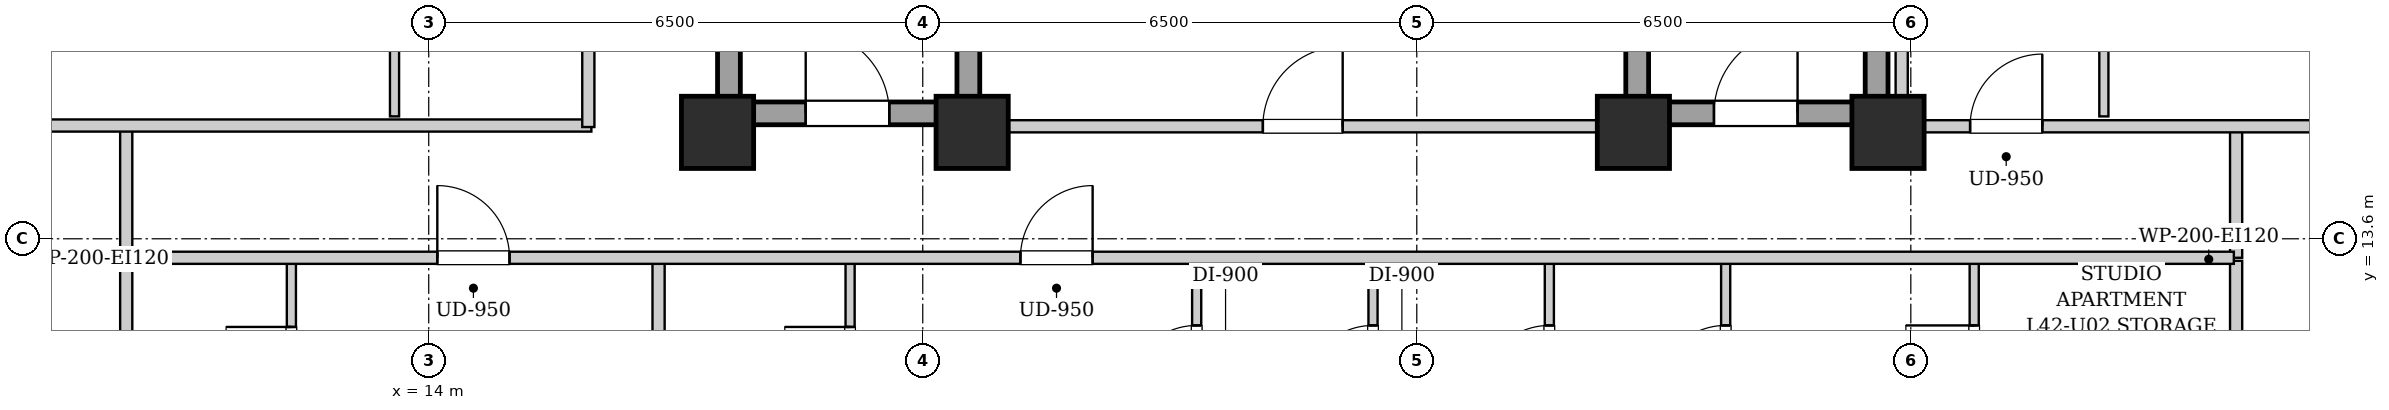
"""IFC4 building model, lengths in metres.
Left out: names, types, materials, properties, quantities, classifications, styles, units other than length and angle.
Written with IfcOpenShell. Run it as: python <this file> out.ifc"""

import sys

from ifc_helpers import new_model, si_unit, direction, frame, frame_2d, origin, origin_2d, place, context, subcontext, project, spatial, rectangle, extrude, element, fill, save


model = new_model("IFC4")
c1 = context("Model", 3, precision=1e-05, world=origin(), true_north=direction((0.0, 1.0)))
c2 = subcontext(c1, "Body", "Model", "MODEL_VIEW")
j1 = project(units=[si_unit("LENGTHUNIT", "METRE"), si_unit("PLANEANGLEUNIT", "RADIAN")], contexts=[c1])
p1 = place(None, origin())
s1 = spatial("IfcSite", under=j1, at=p1, CompositionType="ELEMENT")
p2 = place(p1, origin())
s2 = spatial("IfcBuilding", under=s1, at=p2, CompositionType="ELEMENT")
p3 = place(p2, frame((0.0, 0.0, 147.15)))
s3 = spatial("IfcBuildingStorey", under=s2, at=p3, CompositionType="ELEMENT", Elevation=147.15)
for number, where, z_axis, x_axis in (
    (1, (17.8, 15.0, 0.0), (0.0, 0.0, 1.0), (1.0, 0.0, 0.0)),
    (2, (21.15, 15.0, 0.0), (0.0, 0.0, 1.0), (1.0, 0.0, 0.0)),
    (3, (29.85, 15.0, 0.0), (0.0, 0.0, 1.0), (1.0, 0.0, 0.0)),
    (4, (33.2, 15.0, 0.0), (0.0, 0.0, 1.0), (1.0, 0.0, 0.0)),
):
    element("IfcColumn", number, at=place(p3, frame(where, z_axis=z_axis, x_axis=x_axis)), inside=s3, PredefinedType="COLUMN", context=c2, shape_type="SweptSolid", body=[
        extrude(rectangle(XDim=0.95, YDim=0.95, at=origin_2d()), origin(), (0.0, 0.0, 1.0), 3.25),
    ])
for number, where, z_axis, x_axis in (
    (5, (17.95, 15.1, 0.0), (0.0, 0.0, 1.0), (0.0, 1.0, 0.0)),
    (6, (21.1, 15.1, 0.0), (0.0, 0.0, 1.0), (0.0, 1.0, 0.0)),
):
    element("IfcWall", number, at=place(p3, frame(where, z_axis=z_axis, x_axis=x_axis)), inside=s3, PredefinedType="SHEAR", context=c2, shape_type="SweptSolid", body=[
        extrude(rectangle(XDim=9.0, YDim=0.3, at=frame_2d((4.5, 0.0))), origin(), (0.0, 0.0, 1.0), 2.99),
    ])
p4 = place(p3, frame((18.1, 15.25, 0.0), z_axis=(0.0, 0.0, 1.0), x_axis=(1.0, 0.0, 0.0)))
e7 = element("IfcWall", 7, at=p4, inside=s3, PredefinedType="SHEAR", context=c2, shape_type="SweptSolid", body=[
    extrude(rectangle(XDim=2.85, YDim=0.3, at=frame_2d((1.425, 0.0))), origin(), (0.0, 0.0, 1.0), 2.99),
])
p5 = place(p4, frame((0.86, 0.0, 0.0)))
e8 = element("IfcOpeningElement", 8, at=p5, cuts=e7, PredefinedType="OPENING", context=c2, shape_type="SweptSolid", body=[
    extrude(rectangle(XDim=1.1, YDim=2.05, at=frame_2d((0.55, 1.025))), frame((0.0, 0.16, 0.0), z_axis=(0.0, -1.0, 0.0), x_axis=(1.0, 0.0, 0.0)), (0.0, 0.0, 1.0), 0.32),
])
for number, where, z_axis, x_axis in (
    (9, (29.9, 15.1, 0.0), (0.0, 0.0, 1.0), (0.0, 1.0, 0.0)),
    (10, (33.05, 15.1, 0.0), (0.0, 0.0, 1.0), (0.0, 1.0, 0.0)),
):
    element("IfcWall", number, at=place(p3, frame(where, z_axis=z_axis, x_axis=x_axis)), inside=s3, PredefinedType="SHEAR", context=c2, shape_type="SweptSolid", body=[
        extrude(rectangle(XDim=9.0, YDim=0.3, at=frame_2d((4.5, 0.0))), origin(), (0.0, 0.0, 1.0), 2.99),
    ])
p6 = place(p3, frame((30.05, 15.25, 0.0), z_axis=(0.0, 0.0, 1.0), x_axis=(1.0, 0.0, 0.0)))
e11 = element("IfcWall", 11, at=p6, inside=s3, PredefinedType="SHEAR", context=c2, shape_type="SweptSolid", body=[
    extrude(rectangle(XDim=2.85, YDim=0.3, at=frame_2d((1.425, 0.0))), origin(), (0.0, 0.0, 1.0), 2.99),
])
p7 = place(p6, frame((0.86, 0.0, 0.0)))
e12 = element("IfcOpeningElement", 12, at=p7, cuts=e11, PredefinedType="OPENING", context=c2, shape_type="SweptSolid", body=[
    extrude(rectangle(XDim=1.1, YDim=2.05, at=frame_2d((0.55, 1.025))), frame((0.0, 0.16, 0.0), z_axis=(0.0, -1.0, 0.0), x_axis=(1.0, 0.0, 0.0)), (0.0, 0.0, 1.0), 0.32),
])
p8 = place(p3, frame((21.25, 15.08, 0.0), z_axis=(0.0, 0.0, 1.0), x_axis=(1.0, 0.0, 0.0)))
e13 = element("IfcWall", 13, at=p8, inside=s3, PredefinedType="PARTITIONING", context=c2, shape_type="SweptSolid", body=[
    extrude(rectangle(XDim=8.5, YDim=0.16, at=frame_2d((4.25, 0.0))), origin(), (0.0, 0.0, 1.0), 2.442),
])
p9 = place(p8, frame((3.725, 0.0, 0.0)))
e14 = element("IfcOpeningElement", 14, at=p9, cuts=e13, PredefinedType="OPENING", context=c2, shape_type="SweptSolid", body=[
    extrude(rectangle(XDim=1.05, YDim=2.05, at=frame_2d((0.525, 1.025))), frame((0.0, 0.09, 0.0), z_axis=(0.0, -1.0, 0.0), x_axis=(1.0, 0.0, 0.0)), (0.0, 0.0, 1.0), 0.18),
])
for number, where, z_axis, x_axis in (
    (15, (10.02, 13.35, 0.0), (0.0, 0.0, 1.0), (0.0, 1.0, 0.0)),
    (16, (37.78, 13.35, 0.0), (0.0, 0.0, 1.0), (0.0, 1.0, 0.0)),
):
    element("IfcWall", number, at=place(p3, frame(where, z_axis=z_axis, x_axis=x_axis)), inside=s3, PredefinedType="PARTITIONING", context=c2, shape_type="SweptSolid", body=[
        extrude(rectangle(XDim=1.74, YDim=0.16, at=frame_2d((0.87, 0.0))), origin(), (0.0, 0.0, 1.0), 2.99),
    ])
p10 = place(p3, frame((7.78, 15.09, 0.0), z_axis=(0.0, 0.0, 1.0), x_axis=(1.0, 0.0, 0.0)))
e17 = element("IfcWall", 17, at=p10, inside=s3, PredefinedType="PARTITIONING", context=c2, shape_type="SweptSolid", body=[
    extrude(rectangle(XDim=8.36, YDim=0.16, at=frame_2d((4.18, 0.0))), origin(), (0.0, 0.0, 1.0), 2.442),
])
p11 = place(p3, frame((10.02, 10.65, 0.0), z_axis=(0.0, 0.0, 1.0), x_axis=(0.0, 1.0, 0.0)))
e18 = element("IfcWall", 18, at=p11, inside=s3, PredefinedType="PARTITIONING", context=c2, shape_type="SweptSolid", body=[
    extrude(rectangle(XDim=2.66, YDim=0.16, at=frame_2d((1.33, 0.0))), origin(), (0.0, 0.0, 1.0), 2.99),
])
p12 = place(p3, frame((12.193, 10.71, 0.0), z_axis=(0.0, 0.0, 1.0), x_axis=(0.0, 1.0, 0.0)))
e19 = element("IfcWall", 19, at=p12, inside=s3, PredefinedType="PARTITIONING", context=c2, shape_type="SweptSolid", body=[
    extrude(rectangle(XDim=2.6, YDim=0.12, at=frame_2d((1.3, 0.0))), origin(), (0.0, 0.0, 1.0), 2.99),
])
p13 = place(p12, frame((0.87, 0.0, 0.0)))
e20 = element("IfcOpeningElement", 20, at=p13, cuts=e19, PredefinedType="OPENING", context=c2, shape_type="SweptSolid", body=[
    extrude(rectangle(XDim=0.86, YDim=2.05, at=frame_2d((0.43, 1.025))), frame((0.0, 0.07, 0.0), z_axis=(0.0, -1.0, 0.0), x_axis=(1.0, 0.0, 0.0)), (0.0, 0.0, 1.0), 0.14),
])
p14 = place(p3, frame((37.78, 10.65, 0.0), z_axis=(0.0, 0.0, 1.0), x_axis=(0.0, 1.0, 0.0)))
e21 = element("IfcWall", 21, at=p14, inside=s3, PredefinedType="PARTITIONING", context=c2, shape_type="SweptSolid", body=[
    extrude(rectangle(XDim=2.66, YDim=0.16, at=frame_2d((1.33, 0.0))), origin(), (0.0, 0.0, 1.0), 2.99),
])
p15 = place(p3, frame((17.024, 6.06, 0.0), z_axis=(0.0, 0.0, 1.0), x_axis=(0.0, 1.0, 0.0)))
e22 = element("IfcWall", 22, at=p15, inside=s3, PredefinedType="PARTITIONING", context=c2, shape_type="SweptSolid", body=[
    extrude(rectangle(XDim=7.25, YDim=0.16, at=frame_2d((3.625, 0.0))), origin(), (0.0, 0.0, 1.0), 2.99),
])
p16 = place(p3, frame((19.544, 10.71, 0.0), z_axis=(0.0, 0.0, 1.0), x_axis=(0.0, 1.0, 0.0)))
e23 = element("IfcWall", 23, at=p16, inside=s3, PredefinedType="PARTITIONING", context=c2, shape_type="SweptSolid", body=[
    extrude(rectangle(XDim=2.6, YDim=0.12, at=frame_2d((1.3, 0.0))), origin(), (0.0, 0.0, 1.0), 2.99),
])
p17 = place(p16, frame((0.87, 0.0, 0.0)))
e24 = element("IfcOpeningElement", 24, at=p17, cuts=e23, PredefinedType="OPENING", context=c2, shape_type="SweptSolid", body=[
    extrude(rectangle(XDim=0.86, YDim=2.05, at=frame_2d((0.43, 1.025))), frame((0.0, 0.07, 0.0), z_axis=(0.0, -1.0, 0.0), x_axis=(1.0, 0.0, 0.0)), (0.0, 0.0, 1.0), 0.14),
])
p18 = place(p3, frame((24.104, 10.71, 0.0), z_axis=(0.0, 0.0, 1.0), x_axis=(0.0, 1.0, 0.0)))
e25 = element("IfcWall", 25, at=p18, inside=s3, PredefinedType="PARTITIONING", context=c2, shape_type="SweptSolid", body=[
    extrude(rectangle(XDim=2.6, YDim=0.12, at=frame_2d((1.3, 0.0))), origin(), (0.0, 0.0, 1.0), 2.99),
])
p19 = place(p18, frame((0.85, 0.0, 0.0)))
e26 = element("IfcOpeningElement", 26, at=p19, cuts=e25, PredefinedType="OPENING", context=c2, shape_type="SweptSolid", body=[
    extrude(rectangle(XDim=0.9, YDim=2.05, at=frame_2d((0.45, 1.025))), frame((0.0, 0.07, 0.0), z_axis=(0.0, -1.0, 0.0), x_axis=(1.0, 0.0, 0.0)), (0.0, 0.0, 1.0), 0.14),
])
p20 = place(p3, frame((26.424, 10.71, 0.0), z_axis=(0.0, 0.0, 1.0), x_axis=(0.0, 1.0, 0.0)))
e27 = element("IfcWall", 27, at=p20, inside=s3, PredefinedType="PARTITIONING", context=c2, shape_type="SweptSolid", body=[
    extrude(rectangle(XDim=2.6, YDim=0.12, at=frame_2d((1.3, 0.0))), origin(), (0.0, 0.0, 1.0), 2.99),
])
p21 = place(p20, frame((0.85, 0.0, 0.0)))
e28 = element("IfcOpeningElement", 28, at=p21, cuts=e27, PredefinedType="OPENING", context=c2, shape_type="SweptSolid", body=[
    extrude(rectangle(XDim=0.9, YDim=2.05, at=frame_2d((0.45, 1.025))), frame((0.0, 0.07, 0.0), z_axis=(0.0, -1.0, 0.0), x_axis=(1.0, 0.0, 0.0)), (0.0, 0.0, 1.0), 0.14),
])
p22 = place(p3, frame((28.744, 10.71, 0.0), z_axis=(0.0, 0.0, 1.0), x_axis=(0.0, 1.0, 0.0)))
e29 = element("IfcWall", 29, at=p22, inside=s3, PredefinedType="PARTITIONING", context=c2, shape_type="SweptSolid", body=[
    extrude(rectangle(XDim=2.6, YDim=0.12, at=frame_2d((1.3, 0.0))), origin(), (0.0, 0.0, 1.0), 2.99),
])
p23 = place(p22, frame((0.85, 0.0, 0.0)))
e30 = element("IfcOpeningElement", 30, at=p23, cuts=e29, PredefinedType="OPENING", context=c2, shape_type="SweptSolid", body=[
    extrude(rectangle(XDim=0.9, YDim=2.05, at=frame_2d((0.45, 1.025))), frame((0.0, 0.07, 0.0), z_axis=(0.0, -1.0, 0.0), x_axis=(1.0, 0.0, 0.0)), (0.0, 0.0, 1.0), 0.14),
])
p24 = place(p3, frame((31.064, 10.71, 0.0), z_axis=(0.0, 0.0, 1.0), x_axis=(0.0, 1.0, 0.0)))
e31 = element("IfcWall", 31, at=p24, inside=s3, PredefinedType="PARTITIONING", context=c2, shape_type="SweptSolid", body=[
    extrude(rectangle(XDim=2.6, YDim=0.12, at=frame_2d((1.3, 0.0))), origin(), (0.0, 0.0, 1.0), 2.99),
])
p25 = place(p24, frame((0.85, 0.0, 0.0)))
e32 = element("IfcOpeningElement", 32, at=p25, cuts=e31, PredefinedType="OPENING", context=c2, shape_type="SweptSolid", body=[
    extrude(rectangle(XDim=0.9, YDim=2.05, at=frame_2d((0.45, 1.025))), frame((0.0, 0.07, 0.0), z_axis=(0.0, -1.0, 0.0), x_axis=(1.0, 0.0, 0.0)), (0.0, 0.0, 1.0), 0.14),
])
p26 = place(p3, frame((34.334, 10.71, 0.0), z_axis=(0.0, 0.0, 1.0), x_axis=(0.0, 1.0, 0.0)))
e33 = element("IfcWall", 33, at=p26, inside=s3, PredefinedType="PARTITIONING", context=c2, shape_type="SweptSolid", body=[
    extrude(rectangle(XDim=2.6, YDim=0.12, at=frame_2d((1.3, 0.0))), origin(), (0.0, 0.0, 1.0), 2.99),
])
p27 = place(p26, frame((0.85, 0.0, 0.0)))
e34 = element("IfcOpeningElement", 34, at=p27, cuts=e33, PredefinedType="OPENING", context=c2, shape_type="SweptSolid", body=[
    extrude(rectangle(XDim=0.9, YDim=2.05, at=frame_2d((0.45, 1.025))), frame((0.0, 0.07, 0.0), z_axis=(0.0, -1.0, 0.0), x_axis=(1.0, 0.0, 0.0)), (0.0, 0.0, 1.0), 0.14),
])
p28 = place(p3, frame((13.55, 15.21, 0.0), z_axis=(0.0, 0.0, 1.0), x_axis=(0.0, 1.0, 0.0)))
e35 = element("IfcWall", 35, at=p28, inside=s3, PredefinedType="PARTITIONING", context=c2, shape_type="SweptSolid", body=[
    extrude(rectangle(XDim=1.85, YDim=0.12, at=frame_2d((0.925, 0.0))), origin(), (0.0, 0.0, 1.0), 2.99),
])
p29 = place(p3, frame((33.38, 15.08, 0.0), z_axis=(0.0, 0.0, 1.0), x_axis=(1.0, 0.0, 0.0)))
e36 = element("IfcWall", 36, at=p29, inside=s3, PredefinedType="PARTITIONING", context=c2, shape_type="SweptSolid", body=[
    extrude(rectangle(XDim=6.64, YDim=0.16, at=frame_2d((3.32, 0.0))), origin(), (0.0, 0.0, 1.0), 2.442),
])
p30 = place(p29, frame((0.9, 0.0, 0.0)))
e37 = element("IfcOpeningElement", 37, at=p30, cuts=e36, PredefinedType="OPENING", context=c2, shape_type="SweptSolid", body=[
    extrude(rectangle(XDim=0.95, YDim=2.1, at=frame_2d((0.475, 1.05))), frame((0.0, 0.09, 0.0), z_axis=(0.0, -1.0, 0.0), x_axis=(1.0, 0.0, 0.0)), (0.0, 0.0, 1.0), 0.18),
])
p31 = place(p3, frame((36.04, 15.21, 0.0), z_axis=(0.0, 0.0, 1.0), x_axis=(0.0, 1.0, 0.0)))
e38 = element("IfcWall", 38, at=p31, inside=s3, PredefinedType="PARTITIONING", context=c2, shape_type="SweptSolid", body=[
    extrude(rectangle(XDim=4.308, YDim=0.12, at=frame_2d((2.154, 0.0))), origin(), (0.0, 0.0, 1.0), 2.99),
])
p32 = place(p31, frame((1.704, 0.0, 0.0)))
e39 = element("IfcOpeningElement", 39, at=p32, cuts=e38, PredefinedType="OPENING", context=c2, shape_type="SweptSolid", body=[
    extrude(rectangle(XDim=0.9, YDim=2.05, at=frame_2d((0.45, 1.025))), frame((0.0, 0.07, 0.0), z_axis=(0.0, -1.0, 0.0), x_axis=(1.0, 0.0, 0.0)), (0.0, 0.0, 1.0), 0.14),
])
p33 = place(p3, frame((10.05, 13.35, 0.0), z_axis=(0.0, 0.0, 1.0), x_axis=(1.0, 0.0, 0.0)))
e40 = element("IfcWall", 40, at=p33, inside=s3, PredefinedType="PARTITIONING", context=c2, shape_type="SweptSolid", body=[
    extrude(rectangle(XDim=27.7, YDim=0.16, at=frame_2d((13.85, 0.0))), origin(), (0.0, 0.0, 1.0), 2.99),
])
p34 = place(p33, frame((4.063, 0.0, 0.0)))
e41 = element("IfcOpeningElement", 41, at=p34, cuts=e40, PredefinedType="OPENING", context=c2, shape_type="SweptSolid", body=[
    extrude(rectangle(XDim=0.95, YDim=2.1, at=frame_2d((0.475, 1.05))), frame((0.0, 0.09, 0.0), z_axis=(0.0, -1.0, 0.0), x_axis=(1.0, 0.0, 0.0)), (0.0, 0.0, 1.0), 0.18),
])
p35 = place(p33, frame((11.735, 0.0, 0.0)))
e42 = element("IfcOpeningElement", 42, at=p35, cuts=e40, PredefinedType="OPENING", context=c2, shape_type="SweptSolid", body=[
    extrude(rectangle(XDim=0.95, YDim=2.1, at=frame_2d((0.475, 1.05))), frame((0.0, 0.09, 0.0), z_axis=(0.0, -1.0, 0.0), x_axis=(1.0, 0.0, 0.0)), (0.0, 0.0, 1.0), 0.18),
])
p36 = place(p3, frame((16.1, 15.07, 0.0), z_axis=(0.0, 0.0, 1.0), x_axis=(0.0, 1.0, 0.0)))
e43 = element("IfcWall", 43, at=p36, inside=s3, PredefinedType="PARTITIONING", context=c2, shape_type="SweptSolid", body=[
    extrude(rectangle(XDim=13.93, YDim=0.16, at=frame_2d((6.965, 0.0))), origin(), (0.0, 0.0, 1.0), 2.99),
])
p37 = place(p36, frame((3.608, 0.0, 0.0)))
e44 = element("IfcOpeningElement", 44, at=p37, cuts=e43, PredefinedType="OPENING", context=c2, shape_type="SweptSolid", body=[
    extrude(rectangle(XDim=0.95, YDim=2.1, at=frame_2d((0.475, 1.05))), frame((0.0, 0.09, 0.0), z_axis=(0.0, -1.0, 0.0), x_axis=(1.0, 0.0, 0.0)), (0.0, 0.0, 1.0), 0.18),
])
p38 = place(p36, frame((10.649, 0.0, 0.0)))
e45 = element("IfcOpeningElement", 45, at=p38, cuts=e43, PredefinedType="OPENING", context=c2, shape_type="SweptSolid", body=[
    extrude(rectangle(XDim=0.95, YDim=2.1, at=frame_2d((0.475, 1.05))), frame((0.0, 0.09, 0.0), z_axis=(0.0, -1.0, 0.0), x_axis=(1.0, 0.0, 0.0)), (0.0, 0.0, 1.0), 0.18),
])
p39 = place(p3, frame((33.38, 15.02, 0.0), z_axis=(0.0, 0.0, 1.0), x_axis=(0.0, 1.0, 0.0)))
e46 = element("IfcWall", 46, at=p39, inside=s3, PredefinedType="PARTITIONING", context=c2, shape_type="SweptSolid", body=[
    extrude(rectangle(XDim=13.98, YDim=0.16, at=frame_2d((6.99, 0.0))), origin(), (0.0, 0.0, 1.0), 2.325),
])
p40 = place(p5, origin())
e47 = element("IfcDoor", 47, at=p40, inside=s3, OperationType="SINGLE_SWING_LEFT", PredefinedType="DOOR", context=c2, shape_type="SweptSolid", body=[
    extrude(rectangle(XDim=1.1, YDim=2.05, at=frame_2d((0.55, 1.025))), frame((0.0, 0.025, 0.0), z_axis=(0.0, -1.0, 0.0), x_axis=(1.0, 0.0, 0.0)), (0.0, 0.0, 1.0), 0.05),
])
fill(e8, e47)
p41 = place(p7, origin())
e48 = element("IfcDoor", 48, at=p41, inside=s3, OperationType="SINGLE_SWING_RIGHT", PredefinedType="DOOR", context=c2, shape_type="SweptSolid", body=[
    extrude(rectangle(XDim=1.1, YDim=2.05, at=frame_2d((0.55, 1.025))), frame((0.0, 0.025, 0.0), z_axis=(0.0, -1.0, 0.0), x_axis=(1.0, 0.0, 0.0)), (0.0, 0.0, 1.0), 0.05),
])
fill(e12, e48)
p42 = place(p9, origin())
e49 = element("IfcDoor", 49, at=p42, inside=s3, OperationType="SINGLE_SWING_RIGHT", PredefinedType="DOOR", context=c2, shape_type="SweptSolid", body=[
    extrude(rectangle(XDim=1.05, YDim=2.05, at=frame_2d((0.525, 1.025))), frame((0.0, 0.025, 0.0), z_axis=(0.0, -1.0, 0.0), x_axis=(1.0, 0.0, 0.0)), (0.0, 0.0, 1.0), 0.05),
])
fill(e14, e49)
p43 = place(p13, origin())
e50 = element("IfcDoor", 50, at=p43, inside=s3, OperationType="SINGLE_SWING_RIGHT", PredefinedType="DOOR", context=c2, shape_type="SweptSolid", body=[
    extrude(rectangle(XDim=0.86, YDim=2.05, at=frame_2d((0.43, 1.025))), frame((0.0, 0.025, 0.0), z_axis=(0.0, -1.0, 0.0), x_axis=(1.0, 0.0, 0.0)), (0.0, 0.0, 1.0), 0.05),
])
fill(e20, e50)
p44 = place(p17, origin())
e51 = element("IfcDoor", 51, at=p44, inside=s3, OperationType="SINGLE_SWING_RIGHT", PredefinedType="DOOR", context=c2, shape_type="SweptSolid", body=[
    extrude(rectangle(XDim=0.86, YDim=2.05, at=frame_2d((0.43, 1.025))), frame((0.0, 0.025, 0.0), z_axis=(0.0, -1.0, 0.0), x_axis=(1.0, 0.0, 0.0)), (0.0, 0.0, 1.0), 0.05),
])
fill(e24, e51)
p45 = place(p19, origin())
e52 = element("IfcDoor", 52, at=p45, inside=s3, OperationType="SINGLE_SWING_LEFT", PredefinedType="DOOR", context=c2, shape_type="SweptSolid", body=[
    extrude(rectangle(XDim=0.9, YDim=2.05, at=frame_2d((0.45, 1.025))), frame((0.0, 0.025, 0.0), z_axis=(0.0, -1.0, 0.0), x_axis=(1.0, 0.0, 0.0)), (0.0, 0.0, 1.0), 0.05),
])
fill(e26, e52)
p46 = place(p21, origin())
e53 = element("IfcDoor", 53, at=p46, inside=s3, OperationType="SINGLE_SWING_LEFT", PredefinedType="DOOR", context=c2, shape_type="SweptSolid", body=[
    extrude(rectangle(XDim=0.9, YDim=2.05, at=frame_2d((0.45, 1.025))), frame((0.0, 0.025, 0.0), z_axis=(0.0, -1.0, 0.0), x_axis=(1.0, 0.0, 0.0)), (0.0, 0.0, 1.0), 0.05),
])
fill(e28, e53)
p47 = place(p23, origin())
e54 = element("IfcDoor", 54, at=p47, inside=s3, OperationType="SINGLE_SWING_LEFT", PredefinedType="DOOR", context=c2, shape_type="SweptSolid", body=[
    extrude(rectangle(XDim=0.9, YDim=2.05, at=frame_2d((0.45, 1.025))), frame((0.0, 0.025, 0.0), z_axis=(0.0, -1.0, 0.0), x_axis=(1.0, 0.0, 0.0)), (0.0, 0.0, 1.0), 0.05),
])
fill(e30, e54)
p48 = place(p25, origin())
e55 = element("IfcDoor", 55, at=p48, inside=s3, OperationType="SINGLE_SWING_LEFT", PredefinedType="DOOR", context=c2, shape_type="SweptSolid", body=[
    extrude(rectangle(XDim=0.9, YDim=2.05, at=frame_2d((0.45, 1.025))), frame((0.0, 0.025, 0.0), z_axis=(0.0, -1.0, 0.0), x_axis=(1.0, 0.0, 0.0)), (0.0, 0.0, 1.0), 0.05),
])
fill(e32, e55)
p49 = place(p27, origin())
e56 = element("IfcDoor", 56, at=p49, inside=s3, OperationType="SINGLE_SWING_RIGHT", PredefinedType="DOOR", context=c2, shape_type="SweptSolid", body=[
    extrude(rectangle(XDim=0.9, YDim=2.05, at=frame_2d((0.45, 1.025))), frame((0.0, 0.025, 0.0), z_axis=(0.0, -1.0, 0.0), x_axis=(1.0, 0.0, 0.0)), (0.0, 0.0, 1.0), 0.05),
])
fill(e34, e56)
p50 = place(p30, origin())
e57 = element("IfcDoor", 57, at=p50, inside=s3, OperationType="SINGLE_SWING_RIGHT", PredefinedType="DOOR", context=c2, shape_type="SweptSolid", body=[
    extrude(rectangle(XDim=0.95, YDim=2.1, at=frame_2d((0.475, 1.05))), frame((0.0, 0.025, 0.0), z_axis=(0.0, -1.0, 0.0), x_axis=(1.0, 0.0, 0.0)), (0.0, 0.0, 1.0), 0.05),
])
fill(e37, e57)
p51 = place(p34, origin())
e58 = element("IfcDoor", 58, at=p51, inside=s3, OperationType="SINGLE_SWING_LEFT", PredefinedType="DOOR", context=c2, shape_type="SweptSolid", body=[
    extrude(rectangle(XDim=0.95, YDim=2.1, at=frame_2d((0.475, 1.05))), frame((0.0, 0.025, 0.0), z_axis=(0.0, -1.0, 0.0), x_axis=(1.0, 0.0, 0.0)), (0.0, 0.0, 1.0), 0.05),
])
fill(e41, e58)
p52 = place(p35, origin())
e59 = element("IfcDoor", 59, at=p52, inside=s3, OperationType="SINGLE_SWING_RIGHT", PredefinedType="DOOR", context=c2, shape_type="SweptSolid", body=[
    extrude(rectangle(XDim=0.95, YDim=2.1, at=frame_2d((0.475, 1.05))), frame((0.0, 0.025, 0.0), z_axis=(0.0, -1.0, 0.0), x_axis=(1.0, 0.0, 0.0)), (0.0, 0.0, 1.0), 0.05),
])
fill(e42, e59)
save(model, sys.argv[1])
